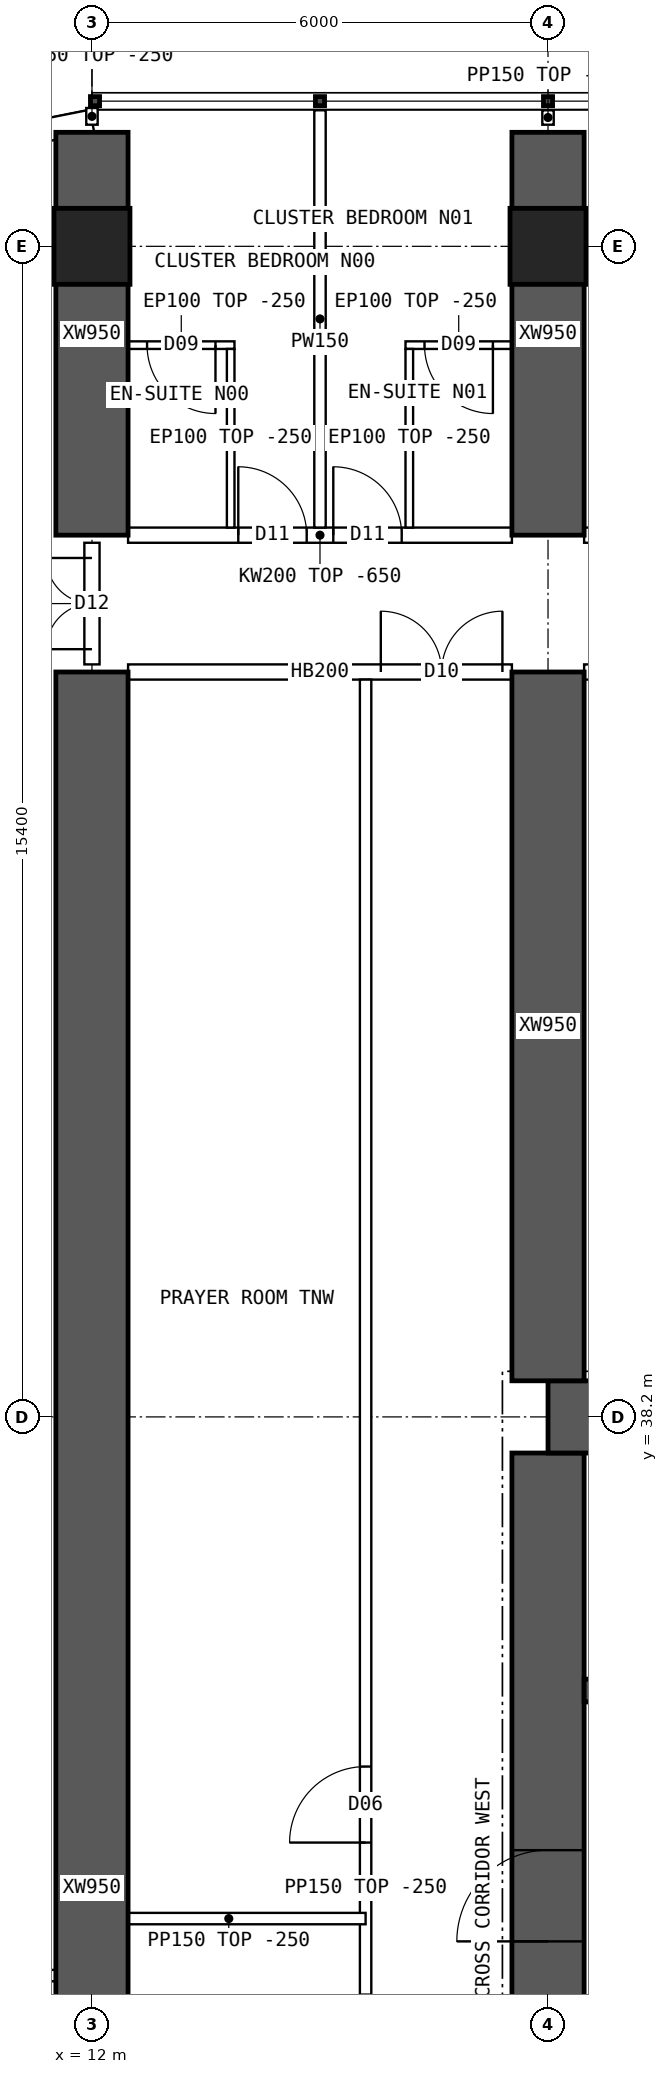
"""IFC4 building model, lengths in metres.
Left out: names, types, materials, properties, quantities, classifications, styles, units other than length and angle.
Written with IfcOpenShell. Run it as: python <this file> out.ifc"""

import sys

from ifc_helpers import new_model, si_unit, direction, frame, frame_2d, origin, origin_2d, place, context, subcontext, project, spatial, polyline, rectangle, hollow_rectangle, outline, extrude, element, fill, save


model = new_model("IFC4")
c1 = context("Model", 3, precision=1e-05, world=origin(), true_north=direction((0.0, 1.0)))
c2 = subcontext(c1, "Body", "Model", "MODEL_VIEW")
j1 = project(units=[si_unit("LENGTHUNIT", "METRE"), si_unit("PLANEANGLEUNIT", "RADIAN")], contexts=[c1])
p1 = place(None, origin())
s1 = spatial("IfcSite", under=j1, at=p1, CompositionType="ELEMENT")
p2 = place(p1, origin())
s2 = spatial("IfcBuilding", under=s1, at=p2, CompositionType="ELEMENT")
p3 = place(p2, frame((0.0, 0.0, 88.15)))
s3 = spatial("IfcBuildingStorey", under=s2, at=p3, CompositionType="ELEMENT", Elevation=88.15)
for number, where, z_axis, x_axis in (
    (1, (12.0, 53.6, 0.0), (0.0, 0.0, 1.0), (1.0, 0.0, 0.0)),
    (2, (18.0, 53.6, 0.0), (0.0, 0.0, 1.0), (1.0, 0.0, 0.0)),
):
    element("IfcColumn", number, at=place(p3, frame(where, z_axis=z_axis, x_axis=x_axis)), inside=s3, PredefinedType="COLUMN", context=c2, shape_type="SweptSolid", body=[
        extrude(hollow_rectangle(XDim=1.0, YDim=1.0, WallThickness=0.1, at=origin_2d()), origin(), (0.0, 0.0, 1.0), 3.75),
    ])
p4 = place(p3, frame((18.0, 38.2, 0.0), z_axis=(0.0, 0.0, 1.0), x_axis=(1.0, 0.0, 0.0)))
e3 = element("IfcWall", 3, at=p4, inside=s3, PredefinedType="SHEAR", context=c2, shape_type="SweptSolid", body=[
    extrude(rectangle(XDim=48.0, YDim=0.95, at=frame_2d((24.0, 0.0))), origin(), (0.0, 0.0, 1.0), 3.75),
])
p5 = place(p3, frame((18.0, 26.275, 0.0), z_axis=(0.0, 0.0, 1.0), x_axis=(0.0, 1.0, 0.0)))
e4 = element("IfcWall", 4, at=p5, inside=s3, PredefinedType="SHEAR", context=c2, shape_type="SweptSolid", body=[
    extrude(rectangle(XDim=11.45, YDim=0.95, at=frame_2d((5.725, 0.0))), origin(), (0.0, 0.0, 1.0), 3.75),
])
p6 = place(p5, frame((5.025, 0.0, 0.0)))
e5 = element("IfcOpeningElement", 5, at=p6, cuts=e4, PredefinedType="OPENING", context=c2, shape_type="SweptSolid", body=[
    extrude(rectangle(XDim=1.2, YDim=2.1, at=frame_2d((0.6, 1.05))), frame((0.0, 0.485, 0.0), z_axis=(0.0, -1.0, 0.0), x_axis=(1.0, 0.0, 0.0)), (0.0, 0.0, 1.0), 0.97),
])
p7 = place(p3, frame((18.475, 34.6, 0.0), z_axis=(0.0, 0.0, 1.0), x_axis=(1.0, 0.0, 0.0)))
e6 = element("IfcWall", 6, at=p7, inside=s3, PredefinedType="SHEAR", context=c2, shape_type="SweptSolid", body=[
    extrude(rectangle(XDim=47.05, YDim=0.3, at=frame_2d((23.525, 0.0))), origin(), (0.0, 0.0, 1.0), 3.75),
])
p8 = place(p7, frame((0.9, 0.0, 0.0)))
e7 = element("IfcOpeningElement", 7, at=p8, cuts=e6, PredefinedType="OPENING", context=c2, shape_type="SweptSolid", body=[
    extrude(rectangle(XDim=1.1, YDim=2.1, at=frame_2d((0.55, 1.05))), frame((0.0, 0.16, 0.0), z_axis=(0.0, -1.0, 0.0), x_axis=(1.0, 0.0, 0.0)), (0.0, 0.0, 1.0), 0.32),
])
p9 = place(p7, frame((45.05, 0.0, 0.0)))
e8 = element("IfcOpeningElement", 8, at=p9, cuts=e6, PredefinedType="OPENING", context=c2, shape_type="SweptSolid", body=[
    extrude(rectangle(XDim=1.1, YDim=2.1, at=frame_2d((0.55, 1.05))), frame((0.0, 0.16, 0.0), z_axis=(0.0, -1.0, 0.0), x_axis=(1.0, 0.0, 0.0)), (0.0, 0.0, 1.0), 0.32),
])
p10 = place(p7, frame((4.125, 0.0, 0.0)))
e9 = element("IfcOpeningElement", 9, at=p10, cuts=e6, PredefinedType="OPENING", context=c2, shape_type="SweptSolid", body=[
    extrude(rectangle(XDim=0.9, YDim=2.1, at=frame_2d((0.45, 1.05))), frame((0.0, 0.16, 0.0), z_axis=(0.0, -1.0, 0.0), x_axis=(1.0, 0.0, 0.0)), (0.0, 0.0, 1.0), 0.32),
])
p11 = place(p7, frame((42.025, 0.0, 0.0)))
e10 = element("IfcOpeningElement", 10, at=p11, cuts=e6, PredefinedType="OPENING", context=c2, shape_type="SweptSolid", body=[
    extrude(rectangle(XDim=0.9, YDim=2.1, at=frame_2d((0.45, 1.05))), frame((0.0, 0.16, 0.0), z_axis=(0.0, -1.0, 0.0), x_axis=(1.0, 0.0, 0.0)), (0.0, 0.0, 1.0), 0.32),
])
p12 = place(p7, frame((8.9, 0.0, 0.0)))
e11 = element("IfcOpeningElement", 11, at=p12, cuts=e6, PredefinedType="OPENING", context=c2, shape_type="SweptSolid", body=[
    extrude(rectangle(XDim=0.9, YDim=2.1, at=frame_2d((0.45, 1.05))), frame((0.0, 0.16, 0.0), z_axis=(0.0, -1.0, 0.0), x_axis=(1.0, 0.0, 0.0)), (0.0, 0.0, 1.0), 0.32),
])
p13 = place(p7, frame((12.874, 0.0, 0.0)))
e12 = element("IfcOpeningElement", 12, at=p13, cuts=e6, PredefinedType="OPENING", context=c2, shape_type="SweptSolid", body=[
    extrude(rectangle(XDim=0.9, YDim=2.1, at=frame_2d((0.45, 1.05))), frame((0.0, 0.16, 0.0), z_axis=(0.0, -1.0, 0.0), x_axis=(1.0, 0.0, 0.0)), (0.0, 0.0, 1.0), 0.32),
])
p14 = place(p7, frame((16.521, 0.0, 0.0)))
e13 = element("IfcOpeningElement", 13, at=p14, cuts=e6, PredefinedType="OPENING", context=c2, shape_type="SweptSolid", body=[
    extrude(rectangle(XDim=0.9, YDim=2.1, at=frame_2d((0.45, 1.05))), frame((0.0, 0.16, 0.0), z_axis=(0.0, -1.0, 0.0), x_axis=(1.0, 0.0, 0.0)), (0.0, 0.0, 1.0), 0.32),
])
p15 = place(p7, frame((20.28, 0.0, 0.0)))
e14 = element("IfcOpeningElement", 14, at=p15, cuts=e6, PredefinedType="OPENING", context=c2, shape_type="SweptSolid", body=[
    extrude(rectangle(XDim=0.9, YDim=2.1, at=frame_2d((0.45, 1.05))), frame((0.0, 0.16, 0.0), z_axis=(0.0, -1.0, 0.0), x_axis=(1.0, 0.0, 0.0)), (0.0, 0.0, 1.0), 0.32),
])
p16 = place(p7, frame((24.686, 0.0, 0.0)))
e15 = element("IfcOpeningElement", 15, at=p16, cuts=e6, PredefinedType="OPENING", context=c2, shape_type="SweptSolid", body=[
    extrude(rectangle(XDim=0.9, YDim=2.1, at=frame_2d((0.45, 1.05))), frame((0.0, 0.16, 0.0), z_axis=(0.0, -1.0, 0.0), x_axis=(1.0, 0.0, 0.0)), (0.0, 0.0, 1.0), 0.32),
])
p17 = place(p7, frame((27.483, 0.0, 0.0)))
e16 = element("IfcOpeningElement", 16, at=p17, cuts=e6, PredefinedType="OPENING", context=c2, shape_type="SweptSolid", body=[
    extrude(rectangle(XDim=0.9, YDim=2.1, at=frame_2d((0.45, 1.05))), frame((0.0, 0.16, 0.0), z_axis=(0.0, -1.0, 0.0), x_axis=(1.0, 0.0, 0.0)), (0.0, 0.0, 1.0), 0.32),
])
p18 = place(p7, frame((33.604, 0.0, 0.0)))
e17 = element("IfcOpeningElement", 17, at=p18, cuts=e6, PredefinedType="OPENING", context=c2, shape_type="SweptSolid", body=[
    extrude(rectangle(XDim=0.9, YDim=2.1, at=frame_2d((0.45, 1.05))), frame((0.0, 0.16, 0.0), z_axis=(0.0, -1.0, 0.0), x_axis=(1.0, 0.0, 0.0)), (0.0, 0.0, 1.0), 0.32),
])
p19 = place(p3, frame((12.0, 49.8, 0.0), z_axis=(0.0, 0.0, 1.0), x_axis=(0.0, 1.0, 0.0)))
e18 = element("IfcWall", 18, at=p19, inside=s3, PredefinedType="SHEAR", context=c2, shape_type="SweptSolid", body=[
    extrude(rectangle(XDim=5.3, YDim=0.95, at=frame_2d((2.65, 0.0))), origin(), (0.0, 0.0, 1.0), 3.75),
])
p20 = place(p3, frame((12.0, 16.0, 0.0), z_axis=(0.0, 0.0, 1.0), x_axis=(0.0, 1.0, 0.0)))
e19 = element("IfcWall", 19, at=p20, inside=s3, PredefinedType="SHEAR", context=c2, shape_type="SweptSolid", body=[
    extrude(rectangle(XDim=32.0, YDim=0.95, at=frame_2d((16.0, 0.0))), origin(), (0.0, 0.0, 1.0), 3.75),
])
p21 = place(p3, frame((18.0, 49.8, 0.0), z_axis=(0.0, 0.0, 1.0), x_axis=(0.0, 1.0, 0.0)))
e20 = element("IfcWall", 20, at=p21, inside=s3, PredefinedType="SHEAR", context=c2, shape_type="SweptSolid", body=[
    extrude(rectangle(XDim=5.3, YDim=0.95, at=frame_2d((2.65, 0.0))), origin(), (0.0, 0.0, 1.0), 3.75),
])
p22 = place(p3, frame((18.0, 38.675, 0.0), z_axis=(0.0, 0.0, 1.0), x_axis=(0.0, 1.0, 0.0)))
e21 = element("IfcWall", 21, at=p22, inside=s3, PredefinedType="SHEAR", context=c2, shape_type="SweptSolid", body=[
    extrude(rectangle(XDim=9.325, YDim=0.95, at=frame_2d((4.663, 0.0))), origin(), (0.0, 0.0, 1.0), 3.75),
])
p23 = place(p3, frame((12.0, 55.25, 0.0), z_axis=(0.0, 0.0, 1.0), x_axis=(-0.980787251524, -0.195080412259, 0.0)))
e22 = element("IfcWall", 22, at=p23, inside=s3, PredefinedType="SOLIDWALL", context=c2, shape_type="SweptSolid", body=[
    extrude(outline(polyline([(-0.03, -0.15), (3.249, -0.15), (3.189, 0.15), (0.03, 0.15), (-0.03, -0.15)])), origin(), (0.0, 0.0, 1.0), 3.5),
])
p24 = place(p23, frame((0.909, 0.0, 0.9)))
e23 = element("IfcOpeningElement", 23, at=p24, cuts=e22, PredefinedType="OPENING", context=c2, shape_type="SweptSolid", body=[
    extrude(rectangle(XDim=1.4, YDim=1.8, at=frame_2d((0.7, 0.9))), frame((0.0, 0.16, 0.0), z_axis=(0.0, -1.0, 0.0), x_axis=(1.0, 0.0, 0.0)), (0.0, 0.0, 1.0), 0.32),
])
p25 = place(p3, frame((12.475, 49.8, 0.0), z_axis=(0.0, 0.0, 1.0), x_axis=(1.0, 0.0, 0.0)))
e24 = element("IfcWall", 24, at=p25, inside=s3, PredefinedType="SOLIDWALL", context=c2, shape_type="SweptSolid", body=[
    extrude(outline(polyline([(0.0, 0.0), (5.05, 0.0), (5.05, 3.1), (0.0, 3.1), (0.0, 0.0)])), frame((0.0, 0.1, 0.0), z_axis=(0.0, -1.0, 0.0), x_axis=(1.0, 0.0, 0.0)), (0.0, 0.0, 1.0), 0.2),
])
p26 = place(p25, frame((1.45, 0.0, 0.0)))
e25 = element("IfcOpeningElement", 25, at=p26, cuts=e24, PredefinedType="OPENING", context=c2, shape_type="SweptSolid", body=[
    extrude(rectangle(XDim=0.9, YDim=2.1, at=frame_2d((0.45, 1.05))), frame((0.0, 0.11, 0.0), z_axis=(0.0, -1.0, 0.0), x_axis=(1.0, 0.0, 0.0)), (0.0, 0.0, 1.0), 0.22),
])
p27 = place(p25, frame((2.7, 0.0, 0.0)))
e26 = element("IfcOpeningElement", 26, at=p27, cuts=e24, PredefinedType="OPENING", context=c2, shape_type="SweptSolid", body=[
    extrude(rectangle(XDim=0.9, YDim=2.1, at=frame_2d((0.45, 1.05))), frame((0.0, 0.11, 0.0), z_axis=(0.0, -1.0, 0.0), x_axis=(1.0, 0.0, 0.0)), (0.0, 0.0, 1.0), 0.22),
])
p28 = place(p3, frame((12.475, 48.0, 0.0), z_axis=(0.0, 0.0, 1.0), x_axis=(1.0, 0.0, 0.0)))
e27 = element("IfcWall", 27, at=p28, inside=s3, PredefinedType="SOLIDWALL", context=c2, shape_type="SweptSolid", body=[
    extrude(rectangle(XDim=5.05, YDim=0.2, at=frame_2d((2.525, 0.0))), origin(), (0.0, 0.0, 1.0), 3.5),
])
p29 = place(p28, frame((3.325, 0.0, 0.0)))
e28 = element("IfcOpeningElement", 28, at=p29, cuts=e27, PredefinedType="OPENING", context=c2, shape_type="SweptSolid", body=[
    extrude(rectangle(XDim=1.6, YDim=2.1, at=frame_2d((0.8, 1.05))), frame((0.0, 0.11, 0.0), z_axis=(0.0, -1.0, 0.0), x_axis=(1.0, 0.0, 0.0)), (0.0, 0.0, 1.0), 0.22),
])
p30 = place(p3, frame((18.475, 49.8, 0.0), z_axis=(0.0, 0.0, 1.0), x_axis=(1.0, 0.0, 0.0)))
e29 = element("IfcWall", 29, at=p30, inside=s3, PredefinedType="SOLIDWALL", context=c2, shape_type="SweptSolid", body=[
    extrude(outline(polyline([(0.0, 0.0), (5.05, 0.0), (5.05, 3.1), (0.0, 3.1), (0.0, 0.0)])), frame((0.0, 0.1, 0.0), z_axis=(0.0, -1.0, 0.0), x_axis=(1.0, 0.0, 0.0)), (0.0, 0.0, 1.0), 0.2),
])
p31 = place(p30, frame((0.6, 0.0, 0.0)))
e30 = element("IfcOpeningElement", 30, at=p31, cuts=e29, PredefinedType="OPENING", context=c2, shape_type="SweptSolid", body=[
    extrude(rectangle(XDim=1.0, YDim=2.1, at=frame_2d((0.5, 1.05))), frame((0.0, 0.11, 0.0), z_axis=(0.0, -1.0, 0.0), x_axis=(1.0, 0.0, 0.0)), (0.0, 0.0, 1.0), 0.22),
])
p32 = place(p3, frame((18.475, 48.0, 0.0), z_axis=(0.0, 0.0, 1.0), x_axis=(1.0, 0.0, 0.0)))
e31 = element("IfcWall", 31, at=p32, inside=s3, PredefinedType="SOLIDWALL", context=c2, shape_type="SweptSolid", body=[
    extrude(rectangle(XDim=5.05, YDim=0.2, at=frame_2d((2.525, 0.0))), origin(), (0.0, 0.0, 1.0), 3.5),
])
p33 = place(p32, frame((0.8, 0.0, 0.0)))
e32 = element("IfcOpeningElement", 32, at=p33, cuts=e31, PredefinedType="OPENING", context=c2, shape_type="SweptSolid", body=[
    extrude(rectangle(XDim=1.0, YDim=2.1, at=frame_2d((0.5, 1.05))), frame((0.0, 0.11, 0.0), z_axis=(0.0, -1.0, 0.0), x_axis=(1.0, 0.0, 0.0)), (0.0, 0.0, 1.0), 0.22),
])
p34 = place(p3, frame((15.0, 55.39, 0.0), z_axis=(0.0, 0.0, 1.0), x_axis=(0.0, -1.0, 0.0)))
e33 = element("IfcWall", 33, at=p34, inside=s3, PredefinedType="PARTITIONING", context=c2, shape_type="SweptSolid", body=[
    extrude(outline(polyline([(0.0, 0.0), (5.49, 0.0), (5.49, 3.1), (5.442, 3.1), (5.44, 3.5), (1.992, 3.5), (1.99, 3.1), (1.592, 3.1), (1.59, 3.5), (0.0, 3.5), (0.0, 0.0)])), frame((0.0, 0.075, 0.0), z_axis=(0.0, -1.0, 0.0), x_axis=(1.0, 0.0, 0.0)), (0.0, 0.0, 1.0), 0.15),
])
p35 = place(p3, frame((12.475, 52.3, 0.0), z_axis=(0.0, 0.0, 1.0), x_axis=(1.0, 0.0, 0.0)))
e34 = element("IfcWall", 34, at=p35, inside=s3, PredefinedType="PARTITIONING", context=c2, shape_type="SweptSolid", body=[
    extrude(rectangle(XDim=1.4, YDim=0.1, at=frame_2d((0.7, 0.0))), origin(), (0.0, 0.0, 1.0), 3.5),
])
p36 = place(p35, frame((0.25, 0.0, 0.0)))
e35 = element("IfcOpeningElement", 35, at=p36, cuts=e34, PredefinedType="OPENING", context=c2, shape_type="SweptSolid", body=[
    extrude(rectangle(XDim=0.9, YDim=2.1, at=frame_2d((0.45, 1.05))), frame((0.0, 0.06, 0.0), z_axis=(0.0, -1.0, 0.0), x_axis=(1.0, 0.0, 0.0)), (0.0, 0.0, 1.0), 0.12),
])
p37 = place(p3, frame((13.825, 52.25, 0.0), z_axis=(0.0, 0.0, 1.0), x_axis=(0.0, -1.0, 0.0)))
e36 = element("IfcWall", 36, at=p37, inside=s3, PredefinedType="PARTITIONING", context=c2, shape_type="SweptSolid", body=[
    extrude(outline(polyline([(0.0, 0.0), (2.35, 0.0), (2.35, 3.1), (2.302, 3.1), (2.3, 3.5), (0.0, 3.5), (0.0, 0.0)])), frame((0.0, 0.05, 0.0), z_axis=(0.0, -1.0, 0.0), x_axis=(1.0, 0.0, 0.0)), (0.0, 0.0, 1.0), 0.1),
])
p38 = place(p3, frame((16.125, 52.3, 0.0), z_axis=(0.0, 0.0, 1.0), x_axis=(1.0, 0.0, 0.0)))
e37 = element("IfcWall", 37, at=p38, inside=s3, PredefinedType="PARTITIONING", context=c2, shape_type="SweptSolid", body=[
    extrude(rectangle(XDim=1.4, YDim=0.1, at=frame_2d((0.7, 0.0))), origin(), (0.0, 0.0, 1.0), 3.5),
])
p39 = place(p38, frame((0.25, 0.0, 0.0)))
e38 = element("IfcOpeningElement", 38, at=p39, cuts=e37, PredefinedType="OPENING", context=c2, shape_type="SweptSolid", body=[
    extrude(rectangle(XDim=0.9, YDim=2.1, at=frame_2d((0.45, 1.05))), frame((0.0, 0.06, 0.0), z_axis=(0.0, -1.0, 0.0), x_axis=(1.0, 0.0, 0.0)), (0.0, 0.0, 1.0), 0.12),
])
p40 = place(p3, frame((16.175, 52.25, 0.0), z_axis=(0.0, 0.0, 1.0), x_axis=(0.0, -1.0, 0.0)))
e39 = element("IfcWall", 39, at=p40, inside=s3, PredefinedType="PARTITIONING", context=c2, shape_type="SweptSolid", body=[
    extrude(outline(polyline([(0.0, 0.0), (2.35, 0.0), (2.35, 3.1), (2.302, 3.1), (2.3, 3.5), (0.0, 3.5), (0.0, 0.0)])), frame((0.0, 0.05, 0.0), z_axis=(0.0, -1.0, 0.0), x_axis=(1.0, 0.0, 0.0)), (0.0, 0.0, 1.0), 0.1),
])
p41 = place(p3, frame((15.6, 16.1, 0.0), z_axis=(0.0, 0.0, 1.0), x_axis=(0.0, 1.0, 0.0)))
e40 = element("IfcWall", 40, at=p41, inside=s3, PredefinedType="PARTITIONING", context=c2, shape_type="SweptSolid", body=[
    extrude(rectangle(XDim=31.8, YDim=0.15, at=frame_2d((15.9, 0.0))), origin(), (0.0, 0.0, 1.0), 3.5),
])
p42 = place(p41, frame((13.5, 0.0, 0.0)))
e41 = element("IfcOpeningElement", 41, at=p42, cuts=e40, PredefinedType="OPENING", context=c2, shape_type="SweptSolid", body=[
    extrude(rectangle(XDim=1.0, YDim=2.1, at=frame_2d((0.5, 1.05))), frame((0.0, 0.085, 0.0), z_axis=(0.0, -1.0, 0.0), x_axis=(1.0, 0.0, 0.0)), (0.0, 0.0, 1.0), 0.17),
])
p43 = place(p41, frame((16.5, 0.0, 0.0)))
e42 = element("IfcOpeningElement", 42, at=p43, cuts=e40, PredefinedType="OPENING", context=c2, shape_type="SweptSolid", body=[
    extrude(rectangle(XDim=1.0, YDim=2.1, at=frame_2d((0.5, 1.05))), frame((0.0, 0.085, 0.0), z_axis=(0.0, -1.0, 0.0), x_axis=(1.0, 0.0, 0.0)), (0.0, 0.0, 1.0), 0.17),
])
p44 = place(p3, frame((12.0, 31.6, 0.0), z_axis=(0.0, 0.0, 1.0), x_axis=(1.0, 0.0, 0.0)))
e43 = element("IfcWall", 43, at=p44, inside=s3, PredefinedType="PARTITIONING", context=c2, shape_type="SweptSolid", body=[
    extrude(rectangle(XDim=3.6, YDim=0.15, at=frame_2d((1.8, 0.0))), origin(), (0.0, 0.0, 1.0), 3.5),
])
p45 = place(p3, frame((3.905, 30.85, 0.0), z_axis=(0.0, 0.0, 1.0), x_axis=(1.0, 0.0, 0.0)))
e44 = element("IfcWall", 44, at=p45, inside=s3, PredefinedType="PARTITIONING", context=c2, shape_type="SweptSolid", body=[
    extrude(outline(polyline([(0.0, 0.0), (8.02, 0.0), (8.02, 3.5), (2.397, 3.5), (2.395, 3.05), (1.797, 3.05), (1.795, 3.5), (0.0, 3.5), (0.0, 0.0)])), frame((0.0, 0.075, 0.0), z_axis=(0.0, -1.0, 0.0), x_axis=(1.0, 0.0, 0.0)), (0.0, 0.0, 1.0), 0.15),
])
p46 = place(p3, frame((12.0, 48.1, 0.0), z_axis=(0.0, 0.0, 1.0), x_axis=(0.0, 1.0, 0.0)))
e45 = element("IfcWall", 45, at=p46, inside=s3, PredefinedType="SOLIDWALL", context=c2, shape_type="SweptSolid", body=[
    extrude(outline(polyline([(0.0, 0.0), (1.6, 0.0), (1.6, 3.1), (0.0, 3.1), (0.0, 0.0)])), frame((0.0, 0.1, 0.0), z_axis=(0.0, -1.0, 0.0), x_axis=(1.0, 0.0, 0.0)), (0.0, 0.0, 1.0), 0.2),
])
p47 = place(p46, frame((0.2, 0.0, 0.0)))
e46 = element("IfcOpeningElement", 46, at=p47, cuts=e45, PredefinedType="OPENING", context=c2, shape_type="SweptSolid", body=[
    extrude(rectangle(XDim=1.2, YDim=2.1, at=frame_2d((0.6, 1.05))), frame((0.0, 0.11, 0.0), z_axis=(0.0, -1.0, 0.0), x_axis=(1.0, 0.0, 0.0)), (0.0, 0.0, 1.0), 0.22),
])
p48 = place(p3, frame((12.0, 55.2, 0.0), z_axis=(0.0, 0.0, 1.0), x_axis=(0.0, 1.0, 0.0)))
e47 = element("IfcWall", 47, at=p48, inside=s3, PredefinedType="PARTITIONING", context=c2, shape_type="SweptSolid", body=[
    extrude(rectangle(XDim=0.22, YDim=0.15, at=frame_2d((0.11, 0.0))), origin(), (0.0, 0.0, 1.0), 3.5),
])
p49 = place(p3, frame((18.0, 55.2, 0.0), z_axis=(0.0, 0.0, 1.0), x_axis=(0.0, 1.0, 0.0)))
e48 = element("IfcWall", 48, at=p49, inside=s3, PredefinedType="PARTITIONING", context=c2, shape_type="SweptSolid", body=[
    extrude(rectangle(XDim=0.19, YDim=0.15, at=frame_2d((0.095, 0.0))), origin(), (0.0, 0.0, 1.0), 3.5),
])
p50 = place(p6, origin())
e49 = element("IfcDoor", 49, at=p50, inside=s3, OperationType="SINGLE_SWING_LEFT", PredefinedType="DOOR", context=c2, shape_type="SweptSolid", body=[
    extrude(rectangle(XDim=1.2, YDim=2.1, at=frame_2d((0.6, 1.05))), frame((0.0, 0.025, 0.0), z_axis=(0.0, -1.0, 0.0), x_axis=(1.0, 0.0, 0.0)), (0.0, 0.0, 1.0), 0.05),
])
fill(e5, e49)
p51 = place(p29, origin())
e50 = element("IfcDoor", 50, at=p51, inside=s3, OperationType="DOUBLE_DOOR_SINGLE_SWING", PredefinedType="DOOR", context=c2, shape_type="SweptSolid", body=[
    extrude(rectangle(XDim=1.6, YDim=2.1, at=frame_2d((0.8, 1.05))), frame((0.0, 0.025, 0.0), z_axis=(0.0, -1.0, 0.0), x_axis=(1.0, 0.0, 0.0)), (0.0, 0.0, 1.0), 0.05),
])
fill(e28, e50)
p52 = place(p36, origin())
e51 = element("IfcDoor", 51, at=p52, inside=s3, OperationType="SINGLE_SWING_RIGHT", PredefinedType="DOOR", context=c2, shape_type="SweptSolid", body=[
    extrude(rectangle(XDim=0.9, YDim=2.1, at=frame_2d((0.45, 1.05))), frame((0.0, 0.025, 0.0), z_axis=(0.0, -1.0, 0.0), x_axis=(1.0, 0.0, 0.0)), (0.0, 0.0, 1.0), 0.05),
])
fill(e35, e51)
p53 = place(p26, origin())
e52 = element("IfcDoor", 52, at=p53, inside=s3, OperationType="SINGLE_SWING_LEFT", PredefinedType="DOOR", context=c2, shape_type="SweptSolid", body=[
    extrude(rectangle(XDim=0.9, YDim=2.1, at=frame_2d((0.45, 1.05))), frame((0.0, 0.025, 0.0), z_axis=(0.0, -1.0, 0.0), x_axis=(1.0, 0.0, 0.0)), (0.0, 0.0, 1.0), 0.05),
])
fill(e25, e52)
p54 = place(p39, origin())
e53 = element("IfcDoor", 53, at=p54, inside=s3, OperationType="SINGLE_SWING_RIGHT", PredefinedType="DOOR", context=c2, shape_type="SweptSolid", body=[
    extrude(rectangle(XDim=0.9, YDim=2.1, at=frame_2d((0.45, 1.05))), frame((0.0, 0.025, 0.0), z_axis=(0.0, -1.0, 0.0), x_axis=(1.0, 0.0, 0.0)), (0.0, 0.0, 1.0), 0.05),
])
fill(e38, e53)
p55 = place(p27, origin())
e54 = element("IfcDoor", 54, at=p55, inside=s3, OperationType="SINGLE_SWING_LEFT", PredefinedType="DOOR", context=c2, shape_type="SweptSolid", body=[
    extrude(rectangle(XDim=0.9, YDim=2.1, at=frame_2d((0.45, 1.05))), frame((0.0, 0.025, 0.0), z_axis=(0.0, -1.0, 0.0), x_axis=(1.0, 0.0, 0.0)), (0.0, 0.0, 1.0), 0.05),
])
fill(e26, e54)
p56 = place(p43, origin())
e55 = element("IfcDoor", 55, at=p56, inside=s3, OperationType="SINGLE_SWING_LEFT", PredefinedType="DOOR", context=c2, shape_type="SweptSolid", body=[
    extrude(rectangle(XDim=1.0, YDim=2.1, at=frame_2d((0.5, 1.05))), frame((0.0, 0.025, 0.0), z_axis=(0.0, -1.0, 0.0), x_axis=(1.0, 0.0, 0.0)), (0.0, 0.0, 1.0), 0.05),
])
fill(e42, e55)
p57 = place(p47, origin())
e56 = element("IfcDoor", 56, at=p57, inside=s3, OperationType="DOUBLE_DOOR_SINGLE_SWING", PredefinedType="DOOR", context=c2, shape_type="SweptSolid", body=[
    extrude(rectangle(XDim=1.2, YDim=2.1, at=frame_2d((0.6, 1.05))), frame((0.0, 0.025, 0.0), z_axis=(0.0, -1.0, 0.0), x_axis=(1.0, 0.0, 0.0)), (0.0, 0.0, 1.0), 0.05),
])
fill(e46, e56)
save(model, sys.argv[1])
